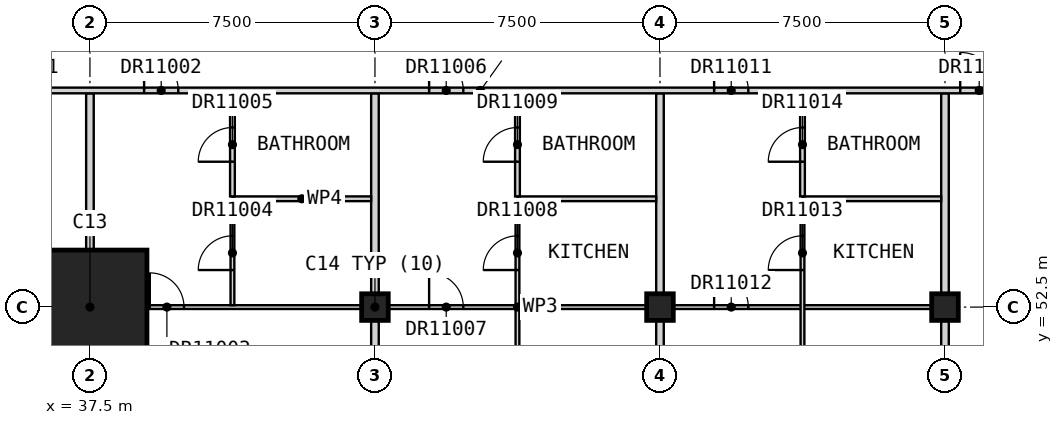
"""IFC4 building model, lengths in metres.
Left out: names, types, materials, properties, quantities, classifications, styles, units other than length and angle.
Written with IfcOpenShell. Run it as: python <this file> out.ifc"""

import sys

from ifc_helpers import new_model, si_unit, direction, frame, frame_2d, origin, origin_2d, place, context, subcontext, project, spatial, rectangle, extrude, element, fill, save


model = new_model("IFC4")
c1 = context("Model", 3, precision=1e-05, world=origin(), true_north=direction((0.0, 1.0)))
c2 = subcontext(c1, "Body", "Model", "MODEL_VIEW")
j1 = project(units=[si_unit("LENGTHUNIT", "METRE"), si_unit("PLANEANGLEUNIT", "RADIAN")], contexts=[c1])
p1 = place(None, origin())
s1 = spatial("IfcSite", under=j1, at=p1, CompositionType="ELEMENT")
p2 = place(p1, origin())
s2 = spatial("IfcBuilding", under=s1, at=p2, CompositionType="ELEMENT")
p3 = place(p2, frame((0.0, 0.0, 276.7)))
s3 = spatial("IfcBuildingStorey", under=s2, at=p3, CompositionType="ELEMENT", Elevation=276.7)
for number, where, z_axis, x_axis in (
    (1, (45.0, 52.5, 0.0), (0.0, 0.0, 1.0), (1.0, 0.0, 0.0)),
    (2, (52.5, 52.5, 0.0), (0.0, 0.0, 1.0), (1.0, 0.0, 0.0)),
    (3, (60.0, 52.5, 0.0), (0.0, 0.0, 1.0), (1.0, 0.0, 0.0)),
):
    element("IfcColumn", number, at=place(p3, frame(where, z_axis=z_axis, x_axis=x_axis)), inside=s3, PredefinedType="COLUMN", context=c2, shape_type="SweptSolid", body=[
        extrude(rectangle(XDim=0.7, YDim=0.7, at=origin_2d()), origin(), (0.0, 0.0, 1.0), 3.5),
    ])
p4 = place(p3, frame((37.5, 52.5, 0.0), z_axis=(0.0, 0.0, 1.0), x_axis=(1.0, 0.0, 0.0)))
e4 = element("IfcColumn", 4, at=p4, inside=s3, PredefinedType="COLUMN", context=c2, shape_type="SweptSolid", body=[
    extrude(rectangle(XDim=3.0, YDim=3.0, at=origin_2d()), origin(), (0.0, 0.0, 1.0), 3.5),
])
p5 = place(p3, frame((37.5, 45.0, 0.0), z_axis=(0.0, 0.0, 1.0), x_axis=(0.0, 1.0, 0.0)))
e5 = element("IfcWall", 5, at=p5, inside=s3, PredefinedType="PARTITIONING", context=c2, shape_type="SweptSolid", body=[
    extrude(rectangle(XDim=13.125, YDim=0.2, at=frame_2d((6.562, 0.0))), origin(), (0.0, 0.0, 1.0), 2.75),
])
for number, where, z_axis, x_axis in (
    (6, (45.0, 45.0, 0.0), (0.0, 0.0, 1.0), (0.0, 1.0, 0.0)),
    (7, (52.5, 45.0, 0.0), (0.0, 0.0, 1.0), (0.0, 1.0, 0.0)),
    (8, (60.0, 45.0, 0.0), (0.0, 0.0, 1.0), (0.0, 1.0, 0.0)),
):
    element("IfcWall", number, at=place(p3, frame(where, z_axis=z_axis, x_axis=x_axis)), inside=s3, PredefinedType="PARTITIONING", context=c2, shape_type="SweptSolid", body=[
        extrude(rectangle(XDim=13.125, YDim=0.2, at=frame_2d((6.562, 0.0))), origin(), (0.0, 0.0, 1.0), 3.25),
    ])
p6 = place(p3, frame((33.75, 58.2, 0.0), z_axis=(0.0, 0.0, 1.0), x_axis=(1.0, 0.0, 0.0)))
e9 = element("IfcWall", 9, at=p6, inside=s3, PredefinedType="PARTITIONING", context=c2, shape_type="SweptSolid", body=[
    extrude(rectangle(XDim=28.05, YDim=0.15, at=frame_2d((14.025, 0.0))), origin(), (0.0, 0.0, 1.0), 3.25),
])
p7 = place(p6, frame((1.375, 0.0, 0.0)))
e10 = element("IfcOpeningElement", 10, at=p7, cuts=e9, PredefinedType="OPENING", context=c2, shape_type="SweptSolid", body=[
    extrude(rectangle(XDim=1.0, YDim=2.1, at=frame_2d((0.5, 1.05))), frame((0.0, 0.085, 0.0), z_axis=(0.0, -1.0, 0.0), x_axis=(1.0, 0.0, 0.0)), (0.0, 0.0, 1.0), 0.17),
])
p8 = place(p6, frame((5.175, 0.0, 0.0)))
e11 = element("IfcOpeningElement", 11, at=p8, cuts=e9, PredefinedType="OPENING", context=c2, shape_type="SweptSolid", body=[
    extrude(rectangle(XDim=0.9, YDim=2.1, at=frame_2d((0.45, 1.05))), frame((0.0, 0.085, 0.0), z_axis=(0.0, -1.0, 0.0), x_axis=(1.0, 0.0, 0.0)), (0.0, 0.0, 1.0), 0.17),
])
p9 = place(p6, frame((12.675, 0.0, 0.0)))
e12 = element("IfcOpeningElement", 12, at=p9, cuts=e9, PredefinedType="OPENING", context=c2, shape_type="SweptSolid", body=[
    extrude(rectangle(XDim=0.9, YDim=2.1, at=frame_2d((0.45, 1.05))), frame((0.0, 0.085, 0.0), z_axis=(0.0, -1.0, 0.0), x_axis=(1.0, 0.0, 0.0)), (0.0, 0.0, 1.0), 0.17),
])
p10 = place(p6, frame((20.175, 0.0, 0.0)))
e13 = element("IfcOpeningElement", 13, at=p10, cuts=e9, PredefinedType="OPENING", context=c2, shape_type="SweptSolid", body=[
    extrude(rectangle(XDim=0.9, YDim=2.1, at=frame_2d((0.45, 1.05))), frame((0.0, 0.085, 0.0), z_axis=(0.0, -1.0, 0.0), x_axis=(1.0, 0.0, 0.0)), (0.0, 0.0, 1.0), 0.17),
])
p11 = place(p6, frame((26.65, 0.0, 0.0)))
e14 = element("IfcOpeningElement", 14, at=p11, cuts=e9, PredefinedType="OPENING", context=c2, shape_type="SweptSolid", body=[
    extrude(rectangle(XDim=1.0, YDim=2.1, at=frame_2d((0.5, 1.05))), frame((0.0, 0.085, 0.0), z_axis=(0.0, -1.0, 0.0), x_axis=(1.0, 0.0, 0.0)), (0.0, 0.0, 1.0), 0.17),
])
p12 = place(p3, frame((37.6, 52.5, 0.0), z_axis=(0.0, 0.0, 1.0), x_axis=(1.0, 0.0, 0.0)))
e15 = element("IfcWall", 15, at=p12, inside=s3, PredefinedType="PARTITIONING", context=c2, shape_type="SweptSolid", body=[
    extrude(rectangle(XDim=22.3, YDim=0.1, at=frame_2d((11.15, 0.0))), origin(), (0.0, 0.0, 1.0), 3.25),
])
p13 = place(p12, frame((1.475, 0.0, 0.0)))
e16 = element("IfcOpeningElement", 16, at=p13, cuts=e15, PredefinedType="OPENING", context=c2, shape_type="SweptSolid", body=[
    extrude(rectangle(XDim=0.9, YDim=2.1, at=frame_2d((0.45, 1.05))), frame((0.0, 0.06, 0.0), z_axis=(0.0, -1.0, 0.0), x_axis=(1.0, 0.0, 0.0)), (0.0, 0.0, 1.0), 0.12),
])
p14 = place(p12, frame((8.825, 0.0, 0.0)))
e17 = element("IfcOpeningElement", 17, at=p14, cuts=e15, PredefinedType="OPENING", context=c2, shape_type="SweptSolid", body=[
    extrude(rectangle(XDim=0.9, YDim=2.1, at=frame_2d((0.45, 1.05))), frame((0.0, 0.06, 0.0), z_axis=(0.0, -1.0, 0.0), x_axis=(1.0, 0.0, 0.0)), (0.0, 0.0, 1.0), 0.12),
])
p15 = place(p12, frame((16.325, 0.0, 0.0)))
e18 = element("IfcOpeningElement", 18, at=p15, cuts=e15, PredefinedType="OPENING", context=c2, shape_type="SweptSolid", body=[
    extrude(rectangle(XDim=0.9, YDim=2.1, at=frame_2d((0.45, 1.05))), frame((0.0, 0.06, 0.0), z_axis=(0.0, -1.0, 0.0), x_axis=(1.0, 0.0, 0.0)), (0.0, 0.0, 1.0), 0.12),
])
p16 = place(p3, frame((41.25, 52.55, 0.0), z_axis=(0.0, 0.0, 1.0), x_axis=(0.0, 1.0, 0.0)))
e19 = element("IfcWall", 19, at=p16, inside=s3, PredefinedType="PARTITIONING", context=c2, shape_type="SweptSolid", body=[
    extrude(rectangle(XDim=2.738, YDim=0.1, at=frame_2d((1.369, 0.0))), origin(), (0.0, 0.0, 1.0), 3.25),
])
p17 = place(p16, frame((0.925, 0.0, 0.0)))
e20 = element("IfcOpeningElement", 20, at=p17, cuts=e19, PredefinedType="OPENING", context=c2, shape_type="SweptSolid", body=[
    extrude(rectangle(XDim=0.9, YDim=2.1, at=frame_2d((0.45, 1.05))), frame((0.0, 0.06, 0.0), z_axis=(0.0, -1.0, 0.0), x_axis=(1.0, 0.0, 0.0)), (0.0, 0.0, 1.0), 0.12),
])
p18 = place(p3, frame((48.75, 45.81, 0.0), z_axis=(0.0, 0.0, 1.0), x_axis=(0.0, 1.0, 0.0)))
e21 = element("IfcWall", 21, at=p18, inside=s3, PredefinedType="PARTITIONING", context=c2, shape_type="SweptSolid", body=[
    extrude(rectangle(XDim=9.478, YDim=0.1, at=frame_2d((4.739, 0.0))), origin(), (0.0, 0.0, 1.0), 3.25),
])
p19 = place(p18, frame((7.665, 0.0, 0.0)))
e22 = element("IfcOpeningElement", 22, at=p19, cuts=e21, PredefinedType="OPENING", context=c2, shape_type="SweptSolid", body=[
    extrude(rectangle(XDim=0.9, YDim=2.1, at=frame_2d((0.45, 1.05))), frame((0.0, 0.06, 0.0), z_axis=(0.0, -1.0, 0.0), x_axis=(1.0, 0.0, 0.0)), (0.0, 0.0, 1.0), 0.12),
])
p20 = place(p18, frame((2.49, 0.0, 0.0)))
e23 = element("IfcOpeningElement", 23, at=p20, cuts=e21, PredefinedType="OPENING", context=c2, shape_type="SweptSolid", body=[
    extrude(rectangle(XDim=0.9, YDim=2.1, at=frame_2d((0.45, 1.05))), frame((0.0, 0.06, 0.0), z_axis=(0.0, -1.0, 0.0), x_axis=(1.0, 0.0, 0.0)), (0.0, 0.0, 1.0), 0.12),
])
p21 = place(p3, frame((56.25, 45.81, 0.0), z_axis=(0.0, 0.0, 1.0), x_axis=(0.0, 1.0, 0.0)))
e24 = element("IfcWall", 24, at=p21, inside=s3, PredefinedType="PARTITIONING", context=c2, shape_type="SweptSolid", body=[
    extrude(rectangle(XDim=9.478, YDim=0.1, at=frame_2d((4.739, 0.0))), origin(), (0.0, 0.0, 1.0), 3.25),
])
p22 = place(p21, frame((7.665, 0.0, 0.0)))
e25 = element("IfcOpeningElement", 25, at=p22, cuts=e24, PredefinedType="OPENING", context=c2, shape_type="SweptSolid", body=[
    extrude(rectangle(XDim=0.9, YDim=2.1, at=frame_2d((0.45, 1.05))), frame((0.0, 0.06, 0.0), z_axis=(0.0, -1.0, 0.0), x_axis=(1.0, 0.0, 0.0)), (0.0, 0.0, 1.0), 0.12),
])
p23 = place(p21, frame((2.49, 0.0, 0.0)))
e26 = element("IfcOpeningElement", 26, at=p23, cuts=e24, PredefinedType="OPENING", context=c2, shape_type="SweptSolid", body=[
    extrude(rectangle(XDim=0.9, YDim=2.1, at=frame_2d((0.45, 1.05))), frame((0.0, 0.06, 0.0), z_axis=(0.0, -1.0, 0.0), x_axis=(1.0, 0.0, 0.0)), (0.0, 0.0, 1.0), 0.12),
])
for number, where, z_axis, x_axis in (
    (27, (41.25, 55.35, 0.0), (0.0, 0.0, 1.0), (1.0, 0.0, 0.0)),
    (28, (48.75, 55.35, 0.0), (0.0, 0.0, 1.0), (1.0, 0.0, 0.0)),
    (29, (56.25, 55.35, 0.0), (0.0, 0.0, 1.0), (1.0, 0.0, 0.0)),
):
    element("IfcWall", number, at=place(p3, frame(where, z_axis=z_axis, x_axis=x_axis)), inside=s3, PredefinedType="PARTITIONING", context=c2, shape_type="SweptSolid", body=[
        extrude(rectangle(XDim=3.65, YDim=0.125, at=frame_2d((1.825, 0.0))), origin(), (0.0, 0.0, 1.0), 3.25),
    ])
p24 = place(p3, frame((41.25, 55.413, 0.0), z_axis=(0.0, 0.0, 1.0), x_axis=(0.0, 1.0, 0.0)))
e30 = element("IfcWall", 30, at=p24, inside=s3, PredefinedType="PARTITIONING", context=c2, shape_type="SweptSolid", body=[
    extrude(rectangle(XDim=2.712, YDim=0.125, at=frame_2d((1.356, 0.0))), origin(), (0.0, 0.0, 1.0), 3.25),
])
p25 = place(p24, frame((0.913, 0.0, 0.0)))
e31 = element("IfcOpeningElement", 31, at=p25, cuts=e30, PredefinedType="OPENING", context=c2, shape_type="SweptSolid", body=[
    extrude(rectangle(XDim=0.9, YDim=2.1, at=frame_2d((0.45, 1.05))), frame((0.0, 0.073, 0.0), z_axis=(0.0, -1.0, 0.0), x_axis=(1.0, 0.0, 0.0)), (0.0, 0.0, 1.0), 0.145),
])
p26 = place(p3, frame((48.75, 55.413, 0.0), z_axis=(0.0, 0.0, 1.0), x_axis=(0.0, 1.0, 0.0)))
e32 = element("IfcWall", 32, at=p26, inside=s3, PredefinedType="PARTITIONING", context=c2, shape_type="SweptSolid", body=[
    extrude(rectangle(XDim=2.712, YDim=0.125, at=frame_2d((1.356, 0.0))), origin(), (0.0, 0.0, 1.0), 3.25),
])
p27 = place(p26, frame((0.913, 0.0, 0.0)))
e33 = element("IfcOpeningElement", 33, at=p27, cuts=e32, PredefinedType="OPENING", context=c2, shape_type="SweptSolid", body=[
    extrude(rectangle(XDim=0.9, YDim=2.1, at=frame_2d((0.45, 1.05))), frame((0.0, 0.073, 0.0), z_axis=(0.0, -1.0, 0.0), x_axis=(1.0, 0.0, 0.0)), (0.0, 0.0, 1.0), 0.145),
])
p28 = place(p3, frame((56.25, 55.413, 0.0), z_axis=(0.0, 0.0, 1.0), x_axis=(0.0, 1.0, 0.0)))
e34 = element("IfcWall", 34, at=p28, inside=s3, PredefinedType="PARTITIONING", context=c2, shape_type="SweptSolid", body=[
    extrude(rectangle(XDim=2.712, YDim=0.125, at=frame_2d((1.356, 0.0))), origin(), (0.0, 0.0, 1.0), 3.25),
])
p29 = place(p28, frame((0.913, 0.0, 0.0)))
e35 = element("IfcOpeningElement", 35, at=p29, cuts=e34, PredefinedType="OPENING", context=c2, shape_type="SweptSolid", body=[
    extrude(rectangle(XDim=0.9, YDim=2.1, at=frame_2d((0.45, 1.05))), frame((0.0, 0.073, 0.0), z_axis=(0.0, -1.0, 0.0), x_axis=(1.0, 0.0, 0.0)), (0.0, 0.0, 1.0), 0.145),
])
p30 = place(p8, origin())
e36 = element("IfcDoor", 36, at=p30, inside=s3, OperationType="SINGLE_SWING_RIGHT", PredefinedType="DOOR", context=c2, shape_type="SweptSolid", body=[
    extrude(rectangle(XDim=0.9, YDim=2.1, at=frame_2d((0.45, 1.05))), frame((0.0, 0.025, 0.0), z_axis=(0.0, -1.0, 0.0), x_axis=(1.0, 0.0, 0.0)), (0.0, 0.0, 1.0), 0.05),
])
fill(e11, e36)
p31 = place(p13, origin())
e37 = element("IfcDoor", 37, at=p31, inside=s3, OperationType="SINGLE_SWING_RIGHT", PredefinedType="DOOR", context=c2, shape_type="SweptSolid", body=[
    extrude(rectangle(XDim=0.9, YDim=2.1, at=frame_2d((0.45, 1.05))), frame((0.0, 0.025, 0.0), z_axis=(0.0, -1.0, 0.0), x_axis=(1.0, 0.0, 0.0)), (0.0, 0.0, 1.0), 0.05),
])
fill(e16, e37)
p32 = place(p17, origin())
e38 = element("IfcDoor", 38, at=p32, inside=s3, OperationType="SINGLE_SWING_RIGHT", PredefinedType="DOOR", context=c2, shape_type="SweptSolid", body=[
    extrude(rectangle(XDim=0.9, YDim=2.1, at=frame_2d((0.45, 1.05))), frame((0.0, 0.025, 0.0), z_axis=(0.0, -1.0, 0.0), x_axis=(1.0, 0.0, 0.0)), (0.0, 0.0, 1.0), 0.05),
])
fill(e20, e38)
p33 = place(p25, origin())
e39 = element("IfcDoor", 39, at=p33, inside=s3, OperationType="SINGLE_SWING_RIGHT", PredefinedType="DOOR", context=c2, shape_type="SweptSolid", body=[
    extrude(rectangle(XDim=0.9, YDim=2.1, at=frame_2d((0.45, 1.05))), frame((0.0, 0.025, 0.0), z_axis=(0.0, -1.0, 0.0), x_axis=(1.0, 0.0, 0.0)), (0.0, 0.0, 1.0), 0.05),
])
fill(e31, e39)
p34 = place(p9, origin())
e40 = element("IfcDoor", 40, at=p34, inside=s3, OperationType="SINGLE_SWING_RIGHT", PredefinedType="DOOR", context=c2, shape_type="SweptSolid", body=[
    extrude(rectangle(XDim=0.9, YDim=2.1, at=frame_2d((0.45, 1.05))), frame((0.0, 0.025, 0.0), z_axis=(0.0, -1.0, 0.0), x_axis=(1.0, 0.0, 0.0)), (0.0, 0.0, 1.0), 0.05),
])
fill(e12, e40)
p35 = place(p14, origin())
e41 = element("IfcDoor", 41, at=p35, inside=s3, OperationType="SINGLE_SWING_LEFT", PredefinedType="DOOR", context=c2, shape_type="SweptSolid", body=[
    extrude(rectangle(XDim=0.9, YDim=2.1, at=frame_2d((0.45, 1.05))), frame((0.0, 0.025, 0.0), z_axis=(0.0, -1.0, 0.0), x_axis=(1.0, 0.0, 0.0)), (0.0, 0.0, 1.0), 0.05),
])
fill(e17, e41)
p36 = place(p19, origin())
e42 = element("IfcDoor", 42, at=p36, inside=s3, OperationType="SINGLE_SWING_RIGHT", PredefinedType="DOOR", context=c2, shape_type="SweptSolid", body=[
    extrude(rectangle(XDim=0.9, YDim=2.1, at=frame_2d((0.45, 1.05))), frame((0.0, 0.025, 0.0), z_axis=(0.0, -1.0, 0.0), x_axis=(1.0, 0.0, 0.0)), (0.0, 0.0, 1.0), 0.05),
])
fill(e22, e42)
p37 = place(p27, origin())
e43 = element("IfcDoor", 43, at=p37, inside=s3, OperationType="SINGLE_SWING_RIGHT", PredefinedType="DOOR", context=c2, shape_type="SweptSolid", body=[
    extrude(rectangle(XDim=0.9, YDim=2.1, at=frame_2d((0.45, 1.05))), frame((0.0, 0.025, 0.0), z_axis=(0.0, -1.0, 0.0), x_axis=(1.0, 0.0, 0.0)), (0.0, 0.0, 1.0), 0.05),
])
fill(e33, e43)
p38 = place(p10, origin())
e44 = element("IfcDoor", 44, at=p38, inside=s3, OperationType="SINGLE_SWING_RIGHT", PredefinedType="DOOR", context=c2, shape_type="SweptSolid", body=[
    extrude(rectangle(XDim=0.9, YDim=2.1, at=frame_2d((0.45, 1.05))), frame((0.0, 0.025, 0.0), z_axis=(0.0, -1.0, 0.0), x_axis=(1.0, 0.0, 0.0)), (0.0, 0.0, 1.0), 0.05),
])
fill(e13, e44)
p39 = place(p15, origin())
e45 = element("IfcDoor", 45, at=p39, inside=s3, OperationType="SINGLE_SWING_LEFT", PredefinedType="DOOR", context=c2, shape_type="SweptSolid", body=[
    extrude(rectangle(XDim=0.9, YDim=2.1, at=frame_2d((0.45, 1.05))), frame((0.0, 0.025, 0.0), z_axis=(0.0, -1.0, 0.0), x_axis=(1.0, 0.0, 0.0)), (0.0, 0.0, 1.0), 0.05),
])
fill(e18, e45)
p40 = place(p22, origin())
e46 = element("IfcDoor", 46, at=p40, inside=s3, OperationType="SINGLE_SWING_RIGHT", PredefinedType="DOOR", context=c2, shape_type="SweptSolid", body=[
    extrude(rectangle(XDim=0.9, YDim=2.1, at=frame_2d((0.45, 1.05))), frame((0.0, 0.025, 0.0), z_axis=(0.0, -1.0, 0.0), x_axis=(1.0, 0.0, 0.0)), (0.0, 0.0, 1.0), 0.05),
])
fill(e25, e46)
p41 = place(p29, origin())
e47 = element("IfcDoor", 47, at=p41, inside=s3, OperationType="SINGLE_SWING_RIGHT", PredefinedType="DOOR", context=c2, shape_type="SweptSolid", body=[
    extrude(rectangle(XDim=0.9, YDim=2.1, at=frame_2d((0.45, 1.05))), frame((0.0, 0.025, 0.0), z_axis=(0.0, -1.0, 0.0), x_axis=(1.0, 0.0, 0.0)), (0.0, 0.0, 1.0), 0.05),
])
fill(e35, e47)
p42 = place(p11, origin())
e48 = element("IfcDoor", 48, at=p42, inside=s3, OperationType="SINGLE_SWING_RIGHT", PredefinedType="DOOR", context=c2, shape_type="SweptSolid", body=[
    extrude(rectangle(XDim=1.0, YDim=2.1, at=frame_2d((0.5, 1.05))), frame((0.0, 0.025, 0.0), z_axis=(0.0, -1.0, 0.0), x_axis=(1.0, 0.0, 0.0)), (0.0, 0.0, 1.0), 0.05),
])
fill(e14, e48)
save(model, sys.argv[1])
